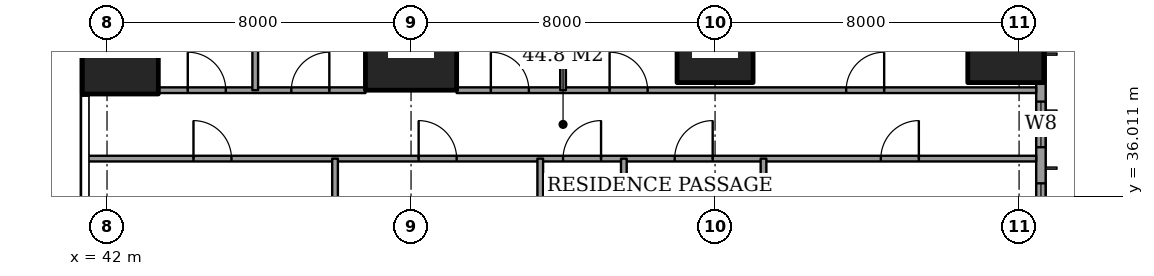
"""IFC4 building model, lengths in metres.
Left out: names, types, materials, properties, quantities, classifications, styles, units other than length and angle.
Written with IfcOpenShell. Run it as: python <this file> out.ifc"""

import sys

from ifc_helpers import new_model, si_unit, direction, frame, frame_2d, origin, origin_2d, place, context, subcontext, project, spatial, rectangle, extrude, element, fill, save


model = new_model("IFC4")
c1 = context("Model", 3, precision=1e-05, world=origin(), true_north=direction((0.0, 1.0)))
c2 = subcontext(c1, "Body", "Model", "MODEL_VIEW")
j1 = project(units=[si_unit("LENGTHUNIT", "METRE"), si_unit("PLANEANGLEUNIT", "RADIAN")], contexts=[c1])
p1 = place(None, origin())
s1 = spatial("IfcSite", under=j1, at=p1, CompositionType="ELEMENT")
p2 = place(p1, origin())
s2 = spatial("IfcBuilding", under=s1, at=p2, CompositionType="ELEMENT")
p3 = place(p2, frame((0.0, 0.0, 54.8)))
s3 = spatial("IfcBuildingStorey", under=s2, at=p3, CompositionType="ELEMENT", Elevation=54.8)
p4 = place(p3, frame((42.35, 40.0, 0.0), z_axis=(0.0, 0.0, 1.0), x_axis=(1.0, 0.0, 0.0)))
e1 = element("IfcColumn", 1, at=p4, inside=s3, PredefinedType="COLUMN", context=c2, shape_type="SweptSolid", body=[
    extrude(rectangle(XDim=2.0, YDim=2.6, at=origin_2d()), origin(), (0.0, 0.0, 1.0), 3.6),
])
p5 = place(p3, frame((50.0, 40.0, 0.0), z_axis=(0.0, 0.0, 1.0), x_axis=(1.0, 0.0, 0.0)))
e2 = element("IfcColumn", 2, at=p5, inside=s3, PredefinedType="COLUMN", context=c2, shape_type="SweptSolid", body=[
    extrude(rectangle(XDim=2.4, YDim=2.4, at=origin_2d()), origin(), (0.0, 0.0, 1.0), 3.6),
])
for number, where, z_axis, x_axis in (
    (3, (58.0, 40.0, 0.0), (0.0, 0.0, 1.0), (1.0, 0.0, 0.0)),
    (4, (65.65, 40.0, 0.0), (0.0, 0.0, 1.0), (1.0, 0.0, 0.0)),
):
    element("IfcColumn", number, at=place(p3, frame(where, z_axis=z_axis, x_axis=x_axis)), inside=s3, PredefinedType="COLUMN", context=c2, shape_type="SweptSolid", body=[
        extrude(rectangle(XDim=2.0, YDim=2.0, at=origin_2d()), origin(), (0.0, 0.0, 1.0), 3.6),
    ])
p6 = place(p3, frame((66.575, 3.175, 0.0), z_axis=(0.0, 0.0, 1.0), x_axis=(0.0, 1.0, 0.0)))
e5 = element("IfcWall", 5, at=p6, inside=s3, PredefinedType="SOLIDWALL", context=c2, shape_type="SweptSolid", body=[
    extrude(rectangle(XDim=41.65, YDim=0.25, at=frame_2d((20.825, 0.0))), origin(), (0.0, 0.0, 1.0), 3.6),
])
p7 = place(p6, frame((0.775, 0.0, 0.6)))
e6 = element("IfcOpeningElement", 6, at=p7, cuts=e5, PredefinedType="OPENING", context=c2, shape_type="SweptSolid", body=[
    extrude(rectangle(XDim=2.4, YDim=2.0, at=frame_2d((1.2, 1.0))), frame((0.0, 0.135, 0.0), z_axis=(0.0, -1.0, 0.0), x_axis=(1.0, 0.0, 0.0)), (0.0, 0.0, 1.0), 0.27),
])
p8 = place(p6, frame((6.125, 0.0, 0.6)))
e7 = element("IfcOpeningElement", 7, at=p8, cuts=e5, PredefinedType="OPENING", context=c2, shape_type="SweptSolid", body=[
    extrude(rectangle(XDim=1.2, YDim=2.0, at=frame_2d((0.6, 1.0))), frame((0.0, 0.135, 0.0), z_axis=(0.0, -1.0, 0.0), x_axis=(1.0, 0.0, 0.0)), (0.0, 0.0, 1.0), 0.27),
])
p9 = place(p6, frame((8.375, 0.0, 0.6)))
e8 = element("IfcOpeningElement", 8, at=p9, cuts=e5, PredefinedType="OPENING", context=c2, shape_type="SweptSolid", body=[
    extrude(rectangle(XDim=2.4, YDim=2.0, at=frame_2d((1.2, 1.0))), frame((0.0, 0.135, 0.0), z_axis=(0.0, -1.0, 0.0), x_axis=(1.0, 0.0, 0.0)), (0.0, 0.0, 1.0), 0.27),
])
p10 = place(p6, frame((15.775, 0.0, 0.6)))
e9 = element("IfcOpeningElement", 9, at=p10, cuts=e5, PredefinedType="OPENING", context=c2, shape_type="SweptSolid", body=[
    extrude(rectangle(XDim=2.4, YDim=2.0, at=frame_2d((1.2, 1.0))), frame((0.0, 0.135, 0.0), z_axis=(0.0, -1.0, 0.0), x_axis=(1.0, 0.0, 0.0)), (0.0, 0.0, 1.0), 0.27),
])
p11 = place(p6, frame((23.475, 0.0, 0.6)))
e10 = element("IfcOpeningElement", 10, at=p11, cuts=e5, PredefinedType="OPENING", context=c2, shape_type="SweptSolid", body=[
    extrude(rectangle(XDim=2.4, YDim=2.0, at=frame_2d((1.2, 1.0))), frame((0.0, 0.135, 0.0), z_axis=(0.0, -1.0, 0.0), x_axis=(1.0, 0.0, 0.0)), (0.0, 0.0, 1.0), 0.27),
])
p12 = place(p6, frame((30.775, 0.0, 0.6)))
e11 = element("IfcOpeningElement", 11, at=p12, cuts=e5, PredefinedType="OPENING", context=c2, shape_type="SweptSolid", body=[
    extrude(rectangle(XDim=2.4, YDim=2.0, at=frame_2d((1.2, 1.0))), frame((0.0, 0.135, 0.0), z_axis=(0.0, -1.0, 0.0), x_axis=(1.0, 0.0, 0.0)), (0.0, 0.0, 1.0), 0.27),
])
p13 = place(p6, frame((34.125, 0.0, 0.6)))
e12 = element("IfcOpeningElement", 12, at=p13, cuts=e5, PredefinedType="OPENING", context=c2, shape_type="SweptSolid", body=[
    extrude(rectangle(XDim=1.2, YDim=2.0, at=frame_2d((0.6, 1.0))), frame((0.0, 0.135, 0.0), z_axis=(0.0, -1.0, 0.0), x_axis=(1.0, 0.0, 0.0)), (0.0, 0.0, 1.0), 0.27),
])
p14 = place(p6, frame((38.475, 0.0, 0.6)))
e13 = element("IfcOpeningElement", 13, at=p14, cuts=e5, PredefinedType="OPENING", context=c2, shape_type="SweptSolid", body=[
    extrude(rectangle(XDim=2.4, YDim=2.0, at=frame_2d((1.2, 1.0))), frame((0.0, 0.135, 0.0), z_axis=(0.0, -1.0, 0.0), x_axis=(1.0, 0.0, 0.0)), (0.0, 0.0, 1.0), 0.27),
])
p15 = place(p3, frame((41.439, 37.0, 0.0), z_axis=(0.0, 0.0, 1.0), x_axis=(1.0, 0.0, 0.0)))
e14 = element("IfcWall", 14, at=p15, inside=s3, PredefinedType="PARTITIONING", context=c2, shape_type="SweptSolid", body=[
    extrude(rectangle(XDim=25.011, YDim=0.15, at=frame_2d((12.505, 0.0))), origin(), (0.0, 0.0, 1.0), 3.35),
])
p16 = place(p15, frame((12.561, 0.0, 0.0)))
e15 = element("IfcOpeningElement", 15, at=p16, cuts=e14, PredefinedType="OPENING", context=c2, shape_type="SweptSolid", body=[
    extrude(rectangle(XDim=1.0, YDim=2.1, at=frame_2d((0.5, 1.05))), frame((0.0, 0.085, 0.0), z_axis=(0.0, -1.0, 0.0), x_axis=(1.0, 0.0, 0.0)), (0.0, 0.0, 1.0), 0.17),
])
p17 = place(p15, frame((20.924, 0.0, 0.0)))
e16 = element("IfcOpeningElement", 16, at=p17, cuts=e14, PredefinedType="OPENING", context=c2, shape_type="SweptSolid", body=[
    extrude(rectangle(XDim=1.0, YDim=2.1, at=frame_2d((0.5, 1.05))), frame((0.0, 0.085, 0.0), z_axis=(0.0, -1.0, 0.0), x_axis=(1.0, 0.0, 0.0)), (0.0, 0.0, 1.0), 0.17),
])
p18 = place(p15, frame((15.499, 0.0, 0.0)))
e17 = element("IfcOpeningElement", 17, at=p18, cuts=e14, PredefinedType="OPENING", context=c2, shape_type="SweptSolid", body=[
    extrude(rectangle(XDim=1.0, YDim=2.1, at=frame_2d((0.5, 1.05))), frame((0.0, 0.085, 0.0), z_axis=(0.0, -1.0, 0.0), x_axis=(1.0, 0.0, 0.0)), (0.0, 0.0, 1.0), 0.17),
])
p19 = place(p15, frame((8.761, 0.0, 0.0)))
e18 = element("IfcOpeningElement", 18, at=p19, cuts=e14, PredefinedType="OPENING", context=c2, shape_type="SweptSolid", body=[
    extrude(rectangle(XDim=1.0, YDim=2.1, at=frame_2d((0.5, 1.05))), frame((0.0, 0.085, 0.0), z_axis=(0.0, -1.0, 0.0), x_axis=(1.0, 0.0, 0.0)), (0.0, 0.0, 1.0), 0.17),
])
p20 = place(p15, frame((2.836, 0.0, 0.0)))
e19 = element("IfcOpeningElement", 19, at=p20, cuts=e14, PredefinedType="OPENING", context=c2, shape_type="SweptSolid", body=[
    extrude(rectangle(XDim=1.0, YDim=2.1, at=frame_2d((0.5, 1.05))), frame((0.0, 0.085, 0.0), z_axis=(0.0, -1.0, 0.0), x_axis=(1.0, 0.0, 0.0)), (0.0, 0.0, 1.0), 0.17),
])
p21 = place(p3, frame((43.35, 38.8, 0.0), z_axis=(0.0, 0.0, 1.0), x_axis=(1.0, 0.0, 0.0)))
e20 = element("IfcWall", 20, at=p21, inside=s3, PredefinedType="PARTITIONING", context=c2, shape_type="SweptSolid", body=[
    extrude(rectangle(XDim=5.45, YDim=0.15, at=frame_2d((2.725, 0.0))), origin(), (0.0, 0.0, 1.0), 3.35),
])
p22 = place(p21, frame((3.5, 0.0, 0.0)))
e21 = element("IfcOpeningElement", 21, at=p22, cuts=e20, PredefinedType="OPENING", context=c2, shape_type="SweptSolid", body=[
    extrude(rectangle(XDim=1.0, YDim=2.1, at=frame_2d((0.5, 1.05))), frame((0.0, 0.085, 0.0), z_axis=(0.0, -1.0, 0.0), x_axis=(1.0, 0.0, 0.0)), (0.0, 0.0, 1.0), 0.17),
])
p23 = place(p21, frame((0.775, 0.0, 0.0)))
e22 = element("IfcOpeningElement", 22, at=p23, cuts=e20, PredefinedType="OPENING", context=c2, shape_type="SweptSolid", body=[
    extrude(rectangle(XDim=1.0, YDim=2.1, at=frame_2d((0.5, 1.05))), frame((0.0, 0.085, 0.0), z_axis=(0.0, -1.0, 0.0), x_axis=(1.0, 0.0, 0.0)), (0.0, 0.0, 1.0), 0.17),
])
p24 = place(p3, frame((51.2, 38.8, 0.0), z_axis=(0.0, 0.0, 1.0), x_axis=(1.0, 0.0, 0.0)))
e23 = element("IfcWall", 23, at=p24, inside=s3, PredefinedType="PARTITIONING", context=c2, shape_type="SweptSolid", body=[
    extrude(rectangle(XDim=15.25, YDim=0.15, at=frame_2d((7.625, 0.0))), origin(), (0.0, 0.0, 1.0), 3.35),
])
p25 = place(p24, frame((10.25, 0.0, 0.0)))
e24 = element("IfcOpeningElement", 24, at=p25, cuts=e23, PredefinedType="OPENING", context=c2, shape_type="SweptSolid", body=[
    extrude(rectangle(XDim=1.0, YDim=2.1, at=frame_2d((0.5, 1.05))), frame((0.0, 0.085, 0.0), z_axis=(0.0, -1.0, 0.0), x_axis=(1.0, 0.0, 0.0)), (0.0, 0.0, 1.0), 0.17),
])
p26 = place(p24, frame((4.025, 0.0, 0.0)))
e25 = element("IfcOpeningElement", 25, at=p26, cuts=e23, PredefinedType="OPENING", context=c2, shape_type="SweptSolid", body=[
    extrude(rectangle(XDim=1.0, YDim=2.1, at=frame_2d((0.5, 1.05))), frame((0.0, 0.085, 0.0), z_axis=(0.0, -1.0, 0.0), x_axis=(1.0, 0.0, 0.0)), (0.0, 0.0, 1.0), 0.17),
])
p27 = place(p24, frame((0.9, 0.0, 0.0)))
e26 = element("IfcOpeningElement", 26, at=p27, cuts=e23, PredefinedType="OPENING", context=c2, shape_type="SweptSolid", body=[
    extrude(rectangle(XDim=1.0, YDim=2.1, at=frame_2d((0.5, 1.05))), frame((0.0, 0.085, 0.0), z_axis=(0.0, -1.0, 0.0), x_axis=(1.0, 0.0, 0.0)), (0.0, 0.0, 1.0), 0.17),
])
p28 = place(p3, frame((45.9, 38.8, 0.0), z_axis=(0.0, 0.0, 1.0), x_axis=(0.0, 1.0, 0.0)))
e27 = element("IfcWall", 27, at=p28, inside=s3, PredefinedType="PARTITIONING", context=c2, shape_type="SweptSolid", body=[
    extrude(rectangle(XDim=9.65, YDim=0.15, at=frame_2d((4.825, 0.0))), origin(), (0.0, 0.0, 1.0), 3.35),
])
p29 = place(p3, frame((48.0, 31.5, 0.0), z_axis=(0.0, 0.0, 1.0), x_axis=(0.0, 1.0, 0.0)))
e28 = element("IfcWall", 28, at=p29, inside=s3, PredefinedType="PARTITIONING", context=c2, shape_type="SweptSolid", body=[
    extrude(rectangle(XDim=5.5, YDim=0.15, at=frame_2d((2.75, 0.0))), origin(), (0.0, 0.0, 1.0), 3.35),
])
p30 = place(p3, frame((53.4, 30.675, 0.0), z_axis=(0.0, 0.0, 1.0), x_axis=(0.0, 1.0, 0.0)))
e29 = element("IfcWall", 29, at=p30, inside=s3, PredefinedType="PARTITIONING", context=c2, shape_type="SweptSolid", body=[
    extrude(rectangle(XDim=6.325, YDim=0.15, at=frame_2d((3.163, 0.0))), origin(), (0.0, 0.0, 1.0), 3.35),
])
p31 = place(p3, frame((54.0, 38.8, 0.0), z_axis=(0.0, 0.0, 1.0), x_axis=(0.0, 1.0, 0.0)))
e30 = element("IfcWall", 30, at=p31, inside=s3, PredefinedType="PARTITIONING", context=c2, shape_type="SweptSolid", body=[
    extrude(rectangle(XDim=9.65, YDim=0.15, at=frame_2d((4.825, 0.0))), origin(), (0.0, 0.0, 1.0), 3.35),
])
p32 = place(p3, frame((55.6, 28.0, 0.0), z_axis=(0.0, 0.0, 1.0), x_axis=(0.0, 1.0, 0.0)))
e31 = element("IfcWall", 31, at=p32, inside=s3, PredefinedType="PARTITIONING", context=c2, shape_type="SweptSolid", body=[
    extrude(rectangle(XDim=9.0, YDim=0.15, at=frame_2d((4.5, 0.0))), origin(), (0.0, 0.0, 1.0), 3.35),
])
p33 = place(p32, frame((0.837, 0.0, 0.0)))
e32 = element("IfcOpeningElement", 32, at=p33, cuts=e31, PredefinedType="OPENING", context=c2, shape_type="SweptSolid", body=[
    extrude(rectangle(XDim=1.0, YDim=2.1, at=frame_2d((0.5, 1.05))), frame((0.0, 0.085, 0.0), z_axis=(0.0, -1.0, 0.0), x_axis=(1.0, 0.0, 0.0)), (0.0, 0.0, 1.0), 0.17),
])
p34 = place(p3, frame((59.275, 33.2, 0.0), z_axis=(0.0, 0.0, 1.0), x_axis=(0.0, 1.0, 0.0)))
e33 = element("IfcWall", 33, at=p34, inside=s3, PredefinedType="PARTITIONING", context=c2, shape_type="SweptSolid", body=[
    extrude(rectangle(XDim=3.8, YDim=0.15, at=frame_2d((1.9, 0.0))), origin(), (0.0, 0.0, 1.0), 3.35),
])
p35 = place(p12, origin())
e34 = element("IfcWindow", 34, at=p35, inside=s3, PartitioningType="SINGLE_PANEL", PredefinedType="WINDOW", context=c2, shape_type="SweptSolid", body=[
    extrude(rectangle(XDim=2.4, YDim=2.0, at=frame_2d((1.2, 1.0))), frame((0.0, 0.03, 0.0), z_axis=(0.0, -1.0, 0.0), x_axis=(1.0, 0.0, 0.0)), (0.0, 0.0, 1.0), 0.06),
])
fill(e11, e34)
p36 = place(p13, origin())
e35 = element("IfcWindow", 35, at=p36, inside=s3, PartitioningType="SINGLE_PANEL", PredefinedType="WINDOW", context=c2, shape_type="SweptSolid", body=[
    extrude(rectangle(XDim=1.2, YDim=2.0, at=frame_2d((0.6, 1.0))), frame((0.0, 0.03, 0.0), z_axis=(0.0, -1.0, 0.0), x_axis=(1.0, 0.0, 0.0)), (0.0, 0.0, 1.0), 0.06),
])
fill(e12, e35)
p37 = place(p25, origin())
e36 = element("IfcDoor", 36, at=p37, inside=s3, OperationType="SINGLE_SWING_LEFT", PredefinedType="DOOR", context=c2, shape_type="SweptSolid", body=[
    extrude(rectangle(XDim=1.0, YDim=2.1, at=frame_2d((0.5, 1.05))), frame((0.0, 0.025, 0.0), z_axis=(0.0, -1.0, 0.0), x_axis=(1.0, 0.0, 0.0)), (0.0, 0.0, 1.0), 0.05),
])
fill(e24, e36)
p38 = place(p26, origin())
e37 = element("IfcDoor", 37, at=p38, inside=s3, OperationType="SINGLE_SWING_RIGHT", PredefinedType="DOOR", context=c2, shape_type="SweptSolid", body=[
    extrude(rectangle(XDim=1.0, YDim=2.1, at=frame_2d((0.5, 1.05))), frame((0.0, 0.025, 0.0), z_axis=(0.0, -1.0, 0.0), x_axis=(1.0, 0.0, 0.0)), (0.0, 0.0, 1.0), 0.05),
])
fill(e25, e37)
p39 = place(p27, origin())
e38 = element("IfcDoor", 38, at=p39, inside=s3, OperationType="SINGLE_SWING_RIGHT", PredefinedType="DOOR", context=c2, shape_type="SweptSolid", body=[
    extrude(rectangle(XDim=1.0, YDim=2.1, at=frame_2d((0.5, 1.05))), frame((0.0, 0.025, 0.0), z_axis=(0.0, -1.0, 0.0), x_axis=(1.0, 0.0, 0.0)), (0.0, 0.0, 1.0), 0.05),
])
fill(e26, e38)
p40 = place(p22, origin())
e39 = element("IfcDoor", 39, at=p40, inside=s3, OperationType="SINGLE_SWING_LEFT", PredefinedType="DOOR", context=c2, shape_type="SweptSolid", body=[
    extrude(rectangle(XDim=1.0, YDim=2.1, at=frame_2d((0.5, 1.05))), frame((0.0, 0.025, 0.0), z_axis=(0.0, -1.0, 0.0), x_axis=(1.0, 0.0, 0.0)), (0.0, 0.0, 1.0), 0.05),
])
fill(e21, e39)
p41 = place(p23, origin())
e40 = element("IfcDoor", 40, at=p41, inside=s3, OperationType="SINGLE_SWING_RIGHT", PredefinedType="DOOR", context=c2, shape_type="SweptSolid", body=[
    extrude(rectangle(XDim=1.0, YDim=2.1, at=frame_2d((0.5, 1.05))), frame((0.0, 0.025, 0.0), z_axis=(0.0, -1.0, 0.0), x_axis=(1.0, 0.0, 0.0)), (0.0, 0.0, 1.0), 0.05),
])
fill(e22, e40)
p42 = place(p16, origin())
e41 = element("IfcDoor", 41, at=p42, inside=s3, OperationType="SINGLE_SWING_LEFT", PredefinedType="DOOR", context=c2, shape_type="SweptSolid", body=[
    extrude(rectangle(XDim=1.0, YDim=2.1, at=frame_2d((0.5, 1.05))), frame((0.0, 0.025, 0.0), z_axis=(0.0, -1.0, 0.0), x_axis=(1.0, 0.0, 0.0)), (0.0, 0.0, 1.0), 0.05),
])
fill(e15, e41)
p43 = place(p17, origin())
e42 = element("IfcDoor", 42, at=p43, inside=s3, OperationType="SINGLE_SWING_LEFT", PredefinedType="DOOR", context=c2, shape_type="SweptSolid", body=[
    extrude(rectangle(XDim=1.0, YDim=2.1, at=frame_2d((0.5, 1.05))), frame((0.0, 0.025, 0.0), z_axis=(0.0, -1.0, 0.0), x_axis=(1.0, 0.0, 0.0)), (0.0, 0.0, 1.0), 0.05),
])
fill(e16, e42)
p44 = place(p18, origin())
e43 = element("IfcDoor", 43, at=p44, inside=s3, OperationType="SINGLE_SWING_LEFT", PredefinedType="DOOR", context=c2, shape_type="SweptSolid", body=[
    extrude(rectangle(XDim=1.0, YDim=2.1, at=frame_2d((0.5, 1.05))), frame((0.0, 0.025, 0.0), z_axis=(0.0, -1.0, 0.0), x_axis=(1.0, 0.0, 0.0)), (0.0, 0.0, 1.0), 0.05),
])
fill(e17, e43)
p45 = place(p19, origin())
e44 = element("IfcDoor", 44, at=p45, inside=s3, OperationType="SINGLE_SWING_RIGHT", PredefinedType="DOOR", context=c2, shape_type="SweptSolid", body=[
    extrude(rectangle(XDim=1.0, YDim=2.1, at=frame_2d((0.5, 1.05))), frame((0.0, 0.025, 0.0), z_axis=(0.0, -1.0, 0.0), x_axis=(1.0, 0.0, 0.0)), (0.0, 0.0, 1.0), 0.05),
])
fill(e18, e44)
p46 = place(p20, origin())
e45 = element("IfcDoor", 45, at=p46, inside=s3, OperationType="SINGLE_SWING_RIGHT", PredefinedType="DOOR", context=c2, shape_type="SweptSolid", body=[
    extrude(rectangle(XDim=1.0, YDim=2.1, at=frame_2d((0.5, 1.05))), frame((0.0, 0.025, 0.0), z_axis=(0.0, -1.0, 0.0), x_axis=(1.0, 0.0, 0.0)), (0.0, 0.0, 1.0), 0.05),
])
fill(e19, e45)
save(model, sys.argv[1])
